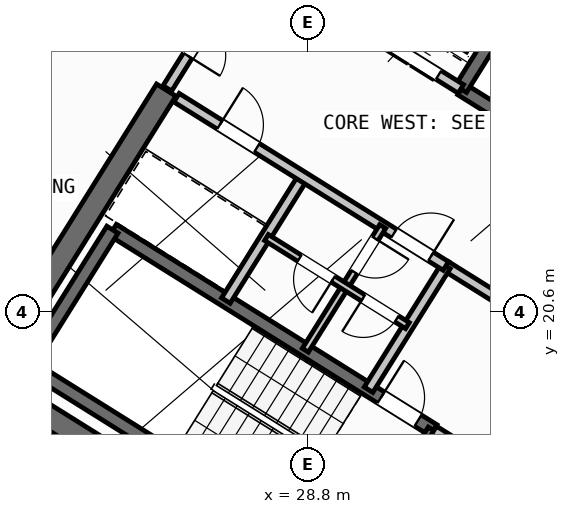
"""IFC4 building model, lengths in metres.
Left out: names, types, materials, properties, quantities, classifications, styles, units other than length and angle.
Written with IfcOpenShell. Run it as: python <this file> out.ifc"""

import sys

from ifc_helpers import new_model, si_unit, direction, frame, frame_2d, origin, place, context, subcontext, project, spatial, rectangle, extrude, source, transform, mapped, element, fill, save


model = new_model("IFC4")
c1 = context("Model", 3, precision=1e-05, world=origin(), true_north=direction((0.0, 1.0)))
c2 = subcontext(c1, "Body", "Model", "MODEL_VIEW")
j1 = project(units=[si_unit("LENGTHUNIT", "METRE"), si_unit("PLANEANGLEUNIT", "RADIAN")], contexts=[c1])
p1 = place(None, origin())
s1 = spatial("IfcSite", under=j1, at=p1, CompositionType="ELEMENT")
p2 = place(p1, origin())
s2 = spatial("IfcBuilding", under=s1, at=p2, CompositionType="ELEMENT")
p3 = place(p2, frame((0.0, 0.0, 270.0)))
s3 = spatial("IfcBuildingStorey", under=s2, at=p3, CompositionType="ELEMENT", Elevation=270.0)
p4 = place(p3, frame((40.531, 24.036, 0.0), z_axis=(0.0, 0.0, 1.0), x_axis=(-0.848048787466, 0.529918157905, 0.0)))
e1 = element("IfcWall", 1, at=p4, inside=s3, PredefinedType="SHEAR", context=c2, shape_type="SweptSolid", body=[
    extrude(rectangle(XDim=13.04, YDim=0.45, at=frame_2d((6.52, 0.0))), origin(), (0.0, 0.0, 1.0), 3.35),
])
p5 = place(p3, frame((33.324, 12.503, 0.0), z_axis=(0.0, 0.0, 1.0), x_axis=(-0.848043529849, 0.529926571782, 0.0)))
e2 = element("IfcWall", 2, at=p5, inside=s3, PredefinedType="SHEAR", context=c2, shape_type="SweptSolid", body=[
    extrude(rectangle(XDim=13.04, YDim=0.45, at=frame_2d((6.52, 0.0))), origin(), (0.0, 0.0, 1.0), 3.35),
])
p6 = place(p3, frame((26.007, 24.976, 0.0), z_axis=(0.0, 0.0, 1.0), x_axis=(-0.529931155655, -0.848040665456, 0.0)))
e3 = element("IfcWall", 3, at=p6, inside=s3, PredefinedType="SHEAR", context=c2, shape_type="SweptSolid", body=[
    extrude(rectangle(XDim=6.475, YDim=0.45, at=frame_2d((3.238, 0.0))), origin(), (0.0, 0.0, 1.0), 3.35),
])
p7 = place(p3, frame((29.268, 6.429, 0.0), z_axis=(0.0, 0.0, 1.0), x_axis=(-0.848049971435, 0.529916263149, 0.0)))
e4 = element("IfcWall", 4, at=p7, inside=s3, PredefinedType="STANDARD", context=c2, shape_type="SweptSolid", body=[
    extrude(rectangle(XDim=31.588, YDim=0.32, at=frame_2d((15.794, 0.0))), origin(), (0.0, 0.0, 1.0), 3.35),
])
p8 = place(p7, frame((16.362, 0.0, 0.0)))
e5 = element("IfcOpeningElement", 5, at=p8, cuts=e4, PredefinedType="OPENING", context=c2, shape_type="SweptSolid", body=[
    extrude(rectangle(XDim=1.2, YDim=2.15, at=frame_2d((0.6, 1.075))), frame((0.0, 0.17, 0.0), z_axis=(0.0, -1.0, 0.0), x_axis=(1.0, 0.0, 0.0)), (0.0, 0.0, 1.0), 0.34),
])
p9 = place(p7, frame((3.859, 0.0, 0.9)))
e6 = element("IfcOpeningElement", 6, at=p9, cuts=e4, PredefinedType="OPENING", context=c2, shape_type="SweptSolid", body=[
    extrude(rectangle(XDim=1.65, YDim=1.45, at=frame_2d((0.825, 0.725))), frame((0.0, 0.17, 0.0), z_axis=(0.0, -1.0, 0.0), x_axis=(1.0, 0.0, 0.0)), (0.0, 0.0, 1.0), 0.34),
])
p10 = place(p7, frame((10.519, 0.0, 0.9)))
e7 = element("IfcOpeningElement", 7, at=p10, cuts=e4, PredefinedType="OPENING", context=c2, shape_type="SweptSolid", body=[
    extrude(rectangle(XDim=1.65, YDim=1.45, at=frame_2d((0.825, 0.725))), frame((0.0, 0.17, 0.0), z_axis=(0.0, -1.0, 0.0), x_axis=(1.0, 0.0, 0.0)), (0.0, 0.0, 1.0), 0.34),
])
p11 = place(p7, frame((21.219, 0.0, 0.95)))
e8 = element("IfcOpeningElement", 8, at=p11, cuts=e4, PredefinedType="OPENING", context=c2, shape_type="SweptSolid", body=[
    extrude(rectangle(XDim=1.95, YDim=1.35, at=frame_2d((0.975, 0.675))), frame((0.0, 0.17, 0.0), z_axis=(0.0, -1.0, 0.0), x_axis=(1.0, 0.0, 0.0)), (0.0, 0.0, 1.0), 0.34),
])
p12 = place(p7, frame((26.406, 0.0, 1.0)))
e9 = element("IfcOpeningElement", 9, at=p12, cuts=e4, PredefinedType="OPENING", context=c2, shape_type="SweptSolid", body=[
    extrude(rectangle(XDim=0.9, YDim=1.25, at=frame_2d((0.45, 0.625))), frame((0.0, 0.17, 0.0), z_axis=(0.0, -1.0, 0.0), x_axis=(1.0, 0.0, 0.0)), (0.0, 0.0, 1.0), 0.34),
])
p13 = place(p7, frame((29.143, 0.0, 0.9)))
e10 = element("IfcOpeningElement", 10, at=p13, cuts=e4, PredefinedType="OPENING", context=c2, shape_type="SweptSolid", body=[
    extrude(rectangle(XDim=1.65, YDim=1.45, at=frame_2d((0.825, 0.725))), frame((0.0, 0.17, 0.0), z_axis=(0.0, -1.0, 0.0), x_axis=(1.0, 0.0, 0.0)), (0.0, 0.0, 1.0), 0.34),
])
p14 = place(p3, frame((14.138, 41.825, 0.0), z_axis=(0.0, 0.0, 1.0), x_axis=(0.848046498049, -0.529921821731, 0.0)))
e11 = element("IfcWall", 11, at=p14, inside=s3, PredefinedType="STANDARD", context=c2, shape_type="SweptSolid", body=[
    extrude(rectangle(XDim=31.588, YDim=0.32, at=frame_2d((15.794, 0.0))), origin(), (0.0, 0.0, 1.0), 3.35),
])
p15 = place(p14, frame((3.46, 0.0, 0.0)))
e12 = element("IfcOpeningElement", 12, at=p15, cuts=e11, PredefinedType="OPENING", context=c2, shape_type="SweptSolid", body=[
    extrude(rectangle(XDim=1.05, YDim=2.15, at=frame_2d((0.525, 1.075))), frame((0.0, 0.17, 0.0), z_axis=(0.0, -1.0, 0.0), x_axis=(1.0, 0.0, 0.0)), (0.0, 0.0, 1.0), 0.34),
])
p16 = place(p14, frame((0.831, 0.0, 1.0)))
e13 = element("IfcOpeningElement", 13, at=p16, cuts=e11, PredefinedType="OPENING", context=c2, shape_type="SweptSolid", body=[
    extrude(rectangle(XDim=0.9, YDim=1.25, at=frame_2d((0.45, 0.625))), frame((0.0, 0.17, 0.0), z_axis=(0.0, -1.0, 0.0), x_axis=(1.0, 0.0, 0.0)), (0.0, 0.0, 1.0), 0.34),
])
p17 = place(p14, frame((8.719, 0.0, 0.9)))
e14 = element("IfcOpeningElement", 14, at=p17, cuts=e11, PredefinedType="OPENING", context=c2, shape_type="SweptSolid", body=[
    extrude(rectangle(XDim=1.35, YDim=1.45, at=frame_2d((0.675, 0.725))), frame((0.0, 0.17, 0.0), z_axis=(0.0, -1.0, 0.0), x_axis=(1.0, 0.0, 0.0)), (0.0, 0.0, 1.0), 0.34),
])
p18 = place(p14, frame((13.599, 0.0, 0.95)))
e15 = element("IfcOpeningElement", 15, at=p18, cuts=e11, PredefinedType="OPENING", context=c2, shape_type="SweptSolid", body=[
    extrude(rectangle(XDim=1.95, YDim=1.35, at=frame_2d((0.975, 0.675))), frame((0.0, 0.17, 0.0), z_axis=(0.0, -1.0, 0.0), x_axis=(1.0, 0.0, 0.0)), (0.0, 0.0, 1.0), 0.34),
])
p19 = place(p14, frame((17.154, 0.0, 1.0)))
e16 = element("IfcOpeningElement", 16, at=p19, cuts=e11, PredefinedType="OPENING", context=c2, shape_type="SweptSolid", body=[
    extrude(rectangle(XDim=0.9, YDim=1.25, at=frame_2d((0.45, 0.625))), frame((0.0, 0.17, 0.0), z_axis=(0.0, -1.0, 0.0), x_axis=(1.0, 0.0, 0.0)), (0.0, 0.0, 1.0), 0.34),
])
p20 = place(p14, frame((21.719, 0.0, 0.9)))
e17 = element("IfcOpeningElement", 17, at=p20, cuts=e11, PredefinedType="OPENING", context=c2, shape_type="SweptSolid", body=[
    extrude(rectangle(XDim=1.65, YDim=1.45, at=frame_2d((0.825, 0.725))), frame((0.0, 0.17, 0.0), z_axis=(0.0, -1.0, 0.0), x_axis=(1.0, 0.0, 0.0)), (0.0, 0.0, 1.0), 0.34),
])
p21 = place(p14, frame((27.419, 0.0, 0.9)))
e18 = element("IfcOpeningElement", 18, at=p21, cuts=e11, PredefinedType="OPENING", context=c2, shape_type="SweptSolid", body=[
    extrude(rectangle(XDim=1.65, YDim=1.45, at=frame_2d((0.825, 0.725))), frame((0.0, 0.17, 0.0), z_axis=(0.0, -1.0, 0.0), x_axis=(1.0, 0.0, 0.0)), (0.0, 0.0, 1.0), 0.34),
])
p22 = place(p3, frame((29.605, 15.581, 0.0), z_axis=(0.0, 0.0, 1.0), x_axis=(-0.848036911448, 0.529937163087, 0.0)))
e19 = element("IfcWall", 19, at=p22, inside=s3, PredefinedType="SHEAR", context=c2, shape_type="SweptSolid", body=[
    extrude(rectangle(XDim=7.46, YDim=0.26, at=frame_2d((3.73, 0.0))), origin(), (0.0, 0.0, 1.0), 3.35),
])
p23 = place(p3, frame((31.28, 18.261, 0.0), z_axis=(0.0, 0.0, 1.0), x_axis=(-0.848051618787, 0.529913626805, 0.0)))
e20 = element("IfcWall", 20, at=p23, inside=s3, PredefinedType="SHEAR", context=c2, shape_type="SweptSolid", body=[
    extrude(rectangle(XDim=7.46, YDim=0.26, at=frame_2d((3.73, 0.0))), origin(), (0.0, 0.0, 1.0), 3.35),
])
p24 = place(p23, frame((0.36, 0.0, 0.0)))
e21 = element("IfcOpeningElement", 21, at=p24, cuts=e20, PredefinedType="OPENING", context=c2, shape_type="SweptSolid", body=[
    extrude(rectangle(XDim=0.86, YDim=2.05, at=frame_2d((0.43, 1.025))), frame((0.0, 0.14, 0.0), z_axis=(0.0, -1.0, 0.0), x_axis=(1.0, 0.0, 0.0)), (0.0, 0.0, 1.0), 0.28),
])
p25 = place(p3, frame((31.288, 18.256, 0.0), z_axis=(0.0, 0.0, 1.0), x_axis=(-0.529943379326, -0.848033026897, 0.0)))
e22 = element("IfcWall", 22, at=p25, inside=s3, PredefinedType="SHEAR", context=c2, shape_type="SweptSolid", body=[
    extrude(rectangle(XDim=3.16, YDim=0.26, at=frame_2d((1.58, 0.0))), origin(), (0.0, 0.0, 1.0), 3.35),
])
p26 = place(p3, frame((24.945, 22.22, 0.0), z_axis=(0.0, 0.0, 1.0), x_axis=(-0.529908658664, -0.84805472316, 0.0)))
e23 = element("IfcWall", 23, at=p26, inside=s3, PredefinedType="SHEAR", context=c2, shape_type="SweptSolid", body=[
    extrude(rectangle(XDim=3.16, YDim=0.26, at=frame_2d((1.58, 0.0))), origin(), (0.0, 0.0, 1.0), 3.35),
])
p27 = place(p3, frame((38.046, 21.108, 0.0), z_axis=(0.0, 0.0, 1.0), x_axis=(-0.848054434086, 0.529909121291, 0.0)))
e24 = element("IfcWall", 24, at=p27, inside=s3, PredefinedType="SHEAR", context=c2, shape_type="SweptSolid", body=[
    extrude(rectangle(XDim=7.33, YDim=0.26, at=frame_2d((3.665, 0.0))), origin(), (0.0, 0.0, 1.0), 3.35),
])
p28 = place(p27, frame((0.22, 0.0, 0.0)))
e25 = element("IfcOpeningElement", 25, at=p28, cuts=e24, PredefinedType="OPENING", context=c2, shape_type="SweptSolid", body=[
    extrude(rectangle(XDim=1.1, YDim=2.1, at=frame_2d((0.55, 1.05))), frame((0.0, 0.14, 0.0), z_axis=(0.0, -1.0, 0.0), x_axis=(1.0, 0.0, 0.0)), (0.0, 0.0, 1.0), 0.28),
])
p29 = place(p3, frame((33.496, 27.677, 0.0), z_axis=(0.0, 0.0, 1.0), x_axis=(-0.529908658664, -0.84805472316, 0.0)))
e26 = element("IfcWall", 26, at=p29, inside=s3, PredefinedType="SHEAR", context=c2, shape_type="SweptSolid", body=[
    extrude(rectangle(XDim=3.16, YDim=0.26, at=frame_2d((1.58, 0.0))), origin(), (0.0, 0.0, 1.0), 3.35),
])
p30 = place(p3, frame((34.933, 15.978, 0.0), z_axis=(0.0, 0.0, 1.0), x_axis=(-0.848055739377, 0.529907032327, 0.0)))
e27 = element("IfcWall", 27, at=p30, inside=s3, PredefinedType="STANDARD", context=c2, shape_type="SweptSolid", body=[
    extrude(rectangle(XDim=4.298, YDim=0.2, at=frame_2d((2.149, 0.0))), origin(), (0.0, 0.0, 1.0), 3.34),
])
p31 = place(p30, frame((0.448, 0.0, 0.0)))
e28 = element("IfcOpeningElement", 28, at=p31, cuts=e27, PredefinedType="OPENING", context=c2, shape_type="SweptSolid", body=[
    extrude(rectangle(XDim=1.3, YDim=2.2, at=frame_2d((0.65, 1.1))), frame((0.0, 0.11, 0.0), z_axis=(0.0, -1.0, 0.0), x_axis=(1.0, 0.0, 0.0)), (0.0, 0.0, 1.0), 0.22),
])
p32 = place(p30, frame((2.523, 0.0, 0.0)))
e29 = element("IfcOpeningElement", 29, at=p32, cuts=e27, PredefinedType="OPENING", context=c2, shape_type="SweptSolid", body=[
    extrude(rectangle(XDim=1.45, YDim=2.25, at=frame_2d((0.725, 1.125))), frame((0.0, 0.11, 0.0), z_axis=(0.0, -1.0, 0.0), x_axis=(1.0, 0.0, 0.0)), (0.0, 0.0, 1.0), 0.22),
])
p33 = place(p3, frame((36.459, 18.421, 0.0), z_axis=(0.0, 0.0, 1.0), x_axis=(-0.848059591691, 0.529900867089, 0.0)))
e30 = element("IfcWall", 30, at=p33, inside=s3, PredefinedType="STANDARD", context=c2, shape_type="SweptSolid", body=[
    extrude(rectangle(XDim=5.818, YDim=0.2, at=frame_2d((2.909, 0.0))), origin(), (0.0, 0.0, 1.0), 3.34),
])
p34 = place(p33, frame((2.598, 0.0, 0.0)))
e31 = element("IfcOpeningElement", 31, at=p34, cuts=e30, PredefinedType="OPENING", context=c2, shape_type="SweptSolid", body=[
    extrude(rectangle(XDim=1.15, YDim=2.1, at=frame_2d((0.575, 1.05))), frame((0.0, 0.11, 0.0), z_axis=(0.0, -1.0, 0.0), x_axis=(1.0, 0.0, 0.0)), (0.0, 0.0, 1.0), 0.22),
])
p35 = place(p3, frame((31.822, 24.998, 0.0), z_axis=(0.0, 0.0, 1.0), x_axis=(-0.848054125777, 0.529909614701, 0.0)))
e32 = element("IfcWall", 32, at=p35, inside=s3, PredefinedType="STANDARD", context=c2, shape_type="SweptSolid", body=[
    extrude(rectangle(XDim=4.668, YDim=0.2, at=frame_2d((2.334, 0.0))), origin(), (0.0, 0.0, 1.0), 3.34),
])
p36 = place(p35, frame((0.52, 0.0, 0.0)))
e33 = element("IfcOpeningElement", 33, at=p36, cuts=e32, PredefinedType="OPENING", context=c2, shape_type="SweptSolid", body=[
    extrude(rectangle(XDim=1.2, YDim=2.15, at=frame_2d((0.6, 1.075))), frame((0.0, 0.11, 0.0), z_axis=(0.0, -1.0, 0.0), x_axis=(1.0, 0.0, 0.0)), (0.0, 0.0, 1.0), 0.22),
])
p37 = place(p35, frame((2.54, 0.0, 0.0)))
e34 = element("IfcOpeningElement", 34, at=p37, cuts=e32, PredefinedType="OPENING", context=c2, shape_type="SweptSolid", body=[
    extrude(rectangle(XDim=1.2, YDim=2.15, at=frame_2d((0.6, 1.075))), frame((0.0, 0.11, 0.0), z_axis=(0.0, -1.0, 0.0), x_axis=(1.0, 0.0, 0.0)), (0.0, 0.0, 1.0), 0.22),
])
for number, where, z_axis, x_axis in (
    (35, (31.525, 21.504, 0.0), (0.0, 0.0, 1.0), (-0.53, -0.848, 0.0)),
    (36, (28.71, 23.263, 0.0), (0.0, 0.0, 1.0), (-0.53, -0.848, 0.0)),
):
    element("IfcWall", number, at=place(p3, frame(where, z_axis=z_axis, x_axis=x_axis)), inside=s3, PredefinedType="STANDARD", context=c2, shape_type="SweptSolid", body=[
        extrude(rectangle(XDim=2.88, YDim=0.2, at=frame_2d((1.44, 0.0))), origin(), (0.0, 0.0, 1.0), 3.34),
    ])
p38 = place(p3, frame((31.525, 21.504, 0.0), z_axis=(0.0, 0.0, 1.0), x_axis=(-0.848042066329, 0.529928913853, 0.0)))
e37 = element("IfcWall", 37, at=p38, inside=s3, PredefinedType="STANDARD", context=c2, shape_type="SweptSolid", body=[
    extrude(rectangle(XDim=6.268, YDim=0.2, at=frame_2d((3.134, 0.0))), origin(), (0.0, 0.0, 1.0), 3.34),
])
p39 = place(p38, frame((4.4, 0.0, 0.0)))
e38 = element("IfcOpeningElement", 38, at=p39, cuts=e37, PredefinedType="OPENING", context=c2, shape_type="SweptSolid", body=[
    extrude(rectangle(XDim=0.86, YDim=2.05, at=frame_2d((0.43, 1.025))), frame((0.0, 0.11, 0.0), z_axis=(0.0, -1.0, 0.0), x_axis=(1.0, 0.0, 0.0)), (0.0, 0.0, 1.0), 0.22),
])
p40 = place(p38, frame((0.35, 0.0, 0.0)))
e39 = element("IfcOpeningElement", 39, at=p40, cuts=e37, PredefinedType="OPENING", context=c2, shape_type="SweptSolid", body=[
    extrude(rectangle(XDim=0.86, YDim=2.05, at=frame_2d((0.43, 1.025))), frame((0.0, 0.11, 0.0), z_axis=(0.0, -1.0, 0.0), x_axis=(1.0, 0.0, 0.0)), (0.0, 0.0, 1.0), 0.22),
])
p41 = place(p3, frame((30.279, 22.283, 0.0), z_axis=(0.0, 0.0, 1.0), x_axis=(-0.529951914384, -0.848027693204, 0.0)))
e40 = element("IfcWall", 40, at=p41, inside=s3, PredefinedType="PLUMBINGWALL", context=c2, shape_type="SweptSolid", body=[
    extrude(rectangle(XDim=1.4, YDim=0.14, at=frame_2d((0.7, 0.0))), origin(), (0.0, 0.0, 1.0), 3.34),
])
p42 = place(p41, frame((0.28, 0.0, 0.0)))
e41 = element("IfcOpeningElement", 41, at=p42, cuts=e40, PredefinedType="OPENING", context=c2, shape_type="SweptSolid", body=[
    extrude(rectangle(XDim=0.78, YDim=2.05, at=frame_2d((0.39, 1.025))), frame((0.0, 0.08, 0.0), z_axis=(0.0, -1.0, 0.0), x_axis=(1.0, 0.0, 0.0)), (0.0, 0.0, 1.0), 0.16),
])
p43 = place(p3, frame((29.537, 21.095, 0.0), z_axis=(0.0, 0.0, 1.0), x_axis=(-0.529865479138, -0.848081702443, 0.0)))
e42 = element("IfcWall", 42, at=p43, inside=s3, PredefinedType="PLUMBINGWALL", context=c2, shape_type="SweptSolid", body=[
    extrude(rectangle(XDim=1.48, YDim=0.14, at=frame_2d((0.74, 0.0))), origin(), (0.0, 0.0, 1.0), 3.34),
])
p44 = place(p3, frame((30.766, 20.327, 0.0), z_axis=(0.0, 0.0, 1.0), x_axis=(-0.848052663127, 0.529911955482, 0.0)))
e43 = element("IfcWall", 43, at=p44, inside=s3, PredefinedType="PLUMBINGWALL", context=c2, shape_type="SweptSolid", body=[
    extrude(rectangle(XDim=3.28, YDim=0.14, at=frame_2d((1.64, 0.0))), origin(), (0.0, 0.0, 1.0), 3.34),
])
p45 = place(p44, frame((0.25, 0.0, 0.0)))
e44 = element("IfcOpeningElement", 44, at=p45, cuts=e43, PredefinedType="OPENING", context=c2, shape_type="SweptSolid", body=[
    extrude(rectangle(XDim=0.78, YDim=2.05, at=frame_2d((0.39, 1.025))), frame((0.0, 0.08, 0.0), z_axis=(0.0, -1.0, 0.0), x_axis=(1.0, 0.0, 0.0)), (0.0, 0.0, 1.0), 0.16),
])
p46 = place(p44, frame((1.73, 0.0, 0.0)))
e45 = element("IfcOpeningElement", 45, at=p46, cuts=e43, PredefinedType="OPENING", context=c2, shape_type="SweptSolid", body=[
    extrude(rectangle(XDim=0.78, YDim=2.05, at=frame_2d((0.39, 1.025))), frame((0.0, 0.08, 0.0), z_axis=(0.0, -1.0, 0.0), x_axis=(1.0, 0.0, 0.0)), (0.0, 0.0, 1.0), 0.16),
])
p47 = place(p3, frame((27.596, 27.52, 0.0), z_axis=(0.0, 0.0, 1.0), x_axis=(-0.529865479138, -0.848081702443, 0.0)))
e46 = element("IfcWall", 46, at=p47, inside=s3, PredefinedType="STANDARD", context=c2, shape_type="SweptSolid", body=[
    extrude(rectangle(XDim=2.96, YDim=0.2, at=frame_2d((1.48, 0.0))), origin(), (0.0, 0.0, 1.0), 3.34),
])
p48 = place(p47, frame((0.7, 0.0, 0.0)))
e47 = element("IfcOpeningElement", 47, at=p48, cuts=e46, PredefinedType="OPENING", context=c2, shape_type="SweptSolid", body=[
    extrude(rectangle(XDim=1.5, YDim=2.15, at=frame_2d((0.75, 1.075))), frame((0.0, 0.11, 0.0), z_axis=(0.0, -1.0, 0.0), x_axis=(1.0, 0.0, 0.0)), (0.0, 0.0, 1.0), 0.22),
])
p49 = place(p3, frame((27.953, 33.016, 0.0), z_axis=(0.0, 0.0, 1.0), x_axis=(-0.529909450694, -0.848054228257, 0.0)))
e48 = element("IfcWall", 48, at=p49, inside=s3, PredefinedType="PARTITIONING", context=c2, shape_type="SweptSolid", body=[
    extrude(rectangle(XDim=10.3, YDim=0.16, at=frame_2d((5.15, 0.0))), origin(), (0.0, 0.0, 1.0), 3.34),
])
p50 = place(p3, frame((32.164, 10.374, 0.0), z_axis=(0.0, 0.0, 1.0), x_axis=(-0.848044107957, 0.529925646633, 0.0)))
e49 = element("IfcWall", 49, at=p50, inside=s3, PredefinedType="PARTITIONING", context=c2, shape_type="SweptSolid", body=[
    extrude(rectangle(XDim=15.57, YDim=0.16, at=frame_2d((7.785, 0.0))), origin(), (0.0, 0.0, 1.0), 3.34),
])
p51 = place(p50, frame((10.83, 0.0, 0.0)))
e50 = element("IfcOpeningElement", 50, at=p51, cuts=e49, PredefinedType="OPENING", context=c2, shape_type="SweptSolid", body=[
    extrude(rectangle(XDim=1.0, YDim=2.1, at=frame_2d((0.5, 1.05))), frame((0.0, 0.09, 0.0), z_axis=(0.0, -1.0, 0.0), x_axis=(1.0, 0.0, 0.0)), (0.0, 0.0, 1.0), 0.18),
])
m1 = source(origin(), c2, "Body", "SweptSolid", [
    extrude(rectangle(XDim=0.86, YDim=2.05, at=frame_2d((0.43, 1.025))), frame((0.0, 0.025, 0.0), z_axis=(0.0, -1.0, 0.0), x_axis=(1.0, 0.0, 0.0)), (0.0, 0.0, 1.0), 0.05),
])
p52 = place(p24, frame((0.86, 0.0, 0.0), z_axis=(0.0, 0.0, 1.0), x_axis=(-1.0, 0.0, 0.0)))
e51 = element("IfcDoor", 51, at=p52, inside=s3, OperationType="SINGLE_SWING_LEFT", PredefinedType="DOOR", context=c2, shape_type="MappedRepresentation", body=[
    mapped(m1, transform((0.0, 0.0, 0.0), scale=1.0)),
])
fill(e21, e51)
m2 = source(origin(), c2, "Body", "SweptSolid", [
    extrude(rectangle(XDim=1.2, YDim=2.15, at=frame_2d((0.6, 1.075))), frame((0.0, 0.025, 0.0), z_axis=(0.0, -1.0, 0.0), x_axis=(1.0, 0.0, 0.0)), (0.0, 0.0, 1.0), 0.05),
])
p53 = place(p36, origin())
e52 = element("IfcDoor", 52, at=p53, inside=s3, OperationType="DOUBLE_DOOR_SLIDING", PredefinedType="DOOR", context=c2, shape_type="MappedRepresentation", body=[
    mapped(m2, transform((0.0, 0.0, 0.0), scale=1.0)),
])
fill(e33, e52)
p54 = place(p39, frame((0.86, 0.0, 0.0), z_axis=(0.0, 0.0, 1.0), x_axis=(-1.0, 0.0, 0.0)))
e53 = element("IfcDoor", 53, at=p54, inside=s3, OperationType="SINGLE_SWING_LEFT", PredefinedType="DOOR", context=c2, shape_type="MappedRepresentation", body=[
    mapped(m1, transform((0.0, 0.0, 0.0), scale=1.0)),
])
fill(e38, e53)
p55 = place(p40, frame((0.86, 0.0, 0.0), z_axis=(0.0, 0.0, 1.0), x_axis=(-1.0, 0.0, 0.0)))
e54 = element("IfcDoor", 54, at=p55, inside=s3, OperationType="SINGLE_SWING_RIGHT", PredefinedType="DOOR", context=c2, shape_type="MappedRepresentation", body=[
    mapped(m1, transform((0.0, 0.0, 0.0), scale=1.0)),
])
fill(e39, e54)
m3 = source(origin(), c2, "Body", "SweptSolid", [
    extrude(rectangle(XDim=0.78, YDim=2.05, at=frame_2d((0.39, 1.025))), frame((0.0, 0.025, 0.0), z_axis=(0.0, -1.0, 0.0), x_axis=(1.0, 0.0, 0.0)), (0.0, 0.0, 1.0), 0.05),
])
p56 = place(p42, origin())
e55 = element("IfcDoor", 55, at=p56, inside=s3, OperationType="SINGLE_SWING_LEFT", PredefinedType="DOOR", context=c2, shape_type="MappedRepresentation", body=[
    mapped(m3, transform((0.0, 0.0, 0.0), scale=1.0)),
])
fill(e41, e55)
p57 = place(p45, origin())
e56 = element("IfcDoor", 56, at=p57, inside=s3, OperationType="SINGLE_SWING_RIGHT", PredefinedType="DOOR", context=c2, shape_type="MappedRepresentation", body=[
    mapped(m3, transform((0.0, 0.0, 0.0), scale=1.0)),
])
fill(e44, e56)
p58 = place(p46, origin())
e57 = element("IfcDoor", 57, at=p58, inside=s3, OperationType="SINGLE_SWING_LEFT", PredefinedType="DOOR", context=c2, shape_type="MappedRepresentation", body=[
    mapped(m3, transform((0.0, 0.0, 0.0), scale=1.0)),
])
fill(e45, e57)
m4 = source(origin(), c2, "Body", "SweptSolid", [
    extrude(rectangle(XDim=1.5, YDim=2.15, at=frame_2d((0.75, 1.075))), frame((0.0, 0.025, 0.0), z_axis=(0.0, -1.0, 0.0), x_axis=(1.0, 0.0, 0.0)), (0.0, 0.0, 1.0), 0.05),
])
p59 = place(p48, origin())
e58 = element("IfcDoor", 58, at=p59, inside=s3, OperationType="DOUBLE_DOOR_SINGLE_SWING", PredefinedType="DOOR", context=c2, shape_type="MappedRepresentation", body=[
    mapped(m4, transform((0.0, 0.0, 0.0), scale=1.0)),
])
fill(e47, e58)
save(model, sys.argv[1])
